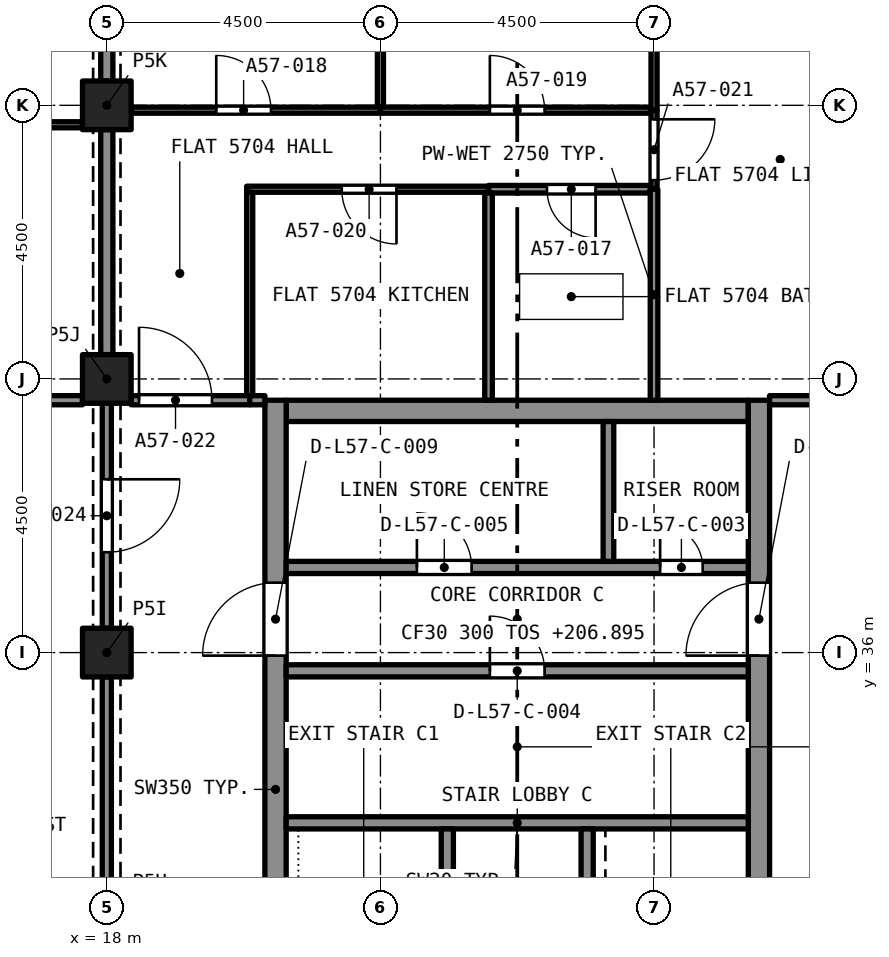
"""IFC4 building model, lengths in metres.
Left out: names, types, materials, properties, quantities, classifications, styles, units other than length and angle.
Written with IfcOpenShell. Run it as: python <this file> out.ifc"""

import sys

from ifc_helpers import new_model, si_unit, direction, frame, frame_2d, origin, origin_2d, place, context, subcontext, project, spatial, rectangle, extrude, element, fill, save


model = new_model("IFC4")
c1 = context("Model", 3, precision=1e-05, world=origin(), true_north=direction((0.0, 1.0)))
c2 = subcontext(c1, "Body", "Model", "MODEL_VIEW")
j1 = project(units=[si_unit("LENGTHUNIT", "METRE"), si_unit("PLANEANGLEUNIT", "RADIAN")], contexts=[c1])
p1 = place(None, origin())
s1 = spatial("IfcSite", under=j1, at=p1, CompositionType="ELEMENT")
p2 = place(p1, origin())
s2 = spatial("IfcBuilding", under=s1, at=p2, CompositionType="ELEMENT")
p3 = place(p2, frame((0.0, 0.0, 206.895)))
s3 = spatial("IfcBuildingStorey", under=s2, at=p3, CompositionType="ELEMENT", Elevation=206.895)
for number, where, z_axis, x_axis in (
    (1, (18.0, 36.0, 0.0), (0.0, 0.0, 1.0), (1.0, 0.0, 0.0)),
    (2, (18.0, 40.5, 0.0), (0.0, 0.0, 1.0), (1.0, 0.0, 0.0)),
    (3, (18.0, 45.0, 0.0), (0.0, 0.0, 1.0), (1.0, 0.0, 0.0)),
):
    element("IfcColumn", number, at=place(p3, frame(where, z_axis=z_axis, x_axis=x_axis)), inside=s3, PredefinedType="COLUMN", context=c2, shape_type="SweptSolid", body=[
        extrude(rectangle(XDim=0.8, YDim=0.8, at=origin_2d()), origin(), (0.0, 0.0, 1.0), 3.2),
    ])
p4 = place(p3, frame((20.95, 39.975, 0.0), z_axis=(0.0, 0.0, 1.0), x_axis=(1.0, 0.0, 0.0)))
e4 = element("IfcWall", 4, at=p4, inside=s3, PredefinedType="SOLIDWALL", context=c2, shape_type="SweptSolid", body=[
    extrude(rectangle(XDim=7.6, YDim=0.35, at=frame_2d((3.8, 0.0))), origin(), (0.0, 0.0, 1.0), 3.2),
])
p5 = place(p3, frame((20.775, 27.35, 0.0), z_axis=(0.0, 0.0, 1.0), x_axis=(0.0, 1.0, 0.0)))
e5 = element("IfcWall", 5, at=p5, inside=s3, PredefinedType="SOLIDWALL", context=c2, shape_type="SweptSolid", body=[
    extrude(rectangle(XDim=12.8, YDim=0.35, at=frame_2d((6.4, 0.0))), origin(), (0.0, 0.0, 1.0), 3.2),
])
p6 = place(p5, frame((8.6, 0.0, 0.0)))
e6 = element("IfcOpeningElement", 6, at=p6, cuts=e5, PredefinedType="OPENING", context=c2, shape_type="SweptSolid", body=[
    extrude(rectangle(XDim=1.2, YDim=2.1, at=frame_2d((0.6, 1.05))), frame((0.0, 0.185, 0.0), z_axis=(0.0, -1.0, 0.0), x_axis=(1.0, 0.0, 0.0)), (0.0, 0.0, 1.0), 0.37),
])
p7 = place(p3, frame((28.725, 27.35, 0.0), z_axis=(0.0, 0.0, 1.0), x_axis=(0.0, 1.0, 0.0)))
e7 = element("IfcWall", 7, at=p7, inside=s3, PredefinedType="SOLIDWALL", context=c2, shape_type="SweptSolid", body=[
    extrude(rectangle(XDim=12.8, YDim=0.35, at=frame_2d((6.4, 0.0))), origin(), (0.0, 0.0, 1.0), 3.2),
])
p8 = place(p7, frame((8.6, 0.0, 0.0)))
e8 = element("IfcOpeningElement", 8, at=p8, cuts=e7, PredefinedType="OPENING", context=c2, shape_type="SweptSolid", body=[
    extrude(rectangle(XDim=1.2, YDim=2.1, at=frame_2d((0.6, 1.05))), frame((0.0, 0.185, 0.0), z_axis=(0.0, -1.0, 0.0), x_axis=(1.0, 0.0, 0.0)), (0.0, 0.0, 1.0), 0.37),
])
p9 = place(p3, frame((13.5, 44.68, 0.0), z_axis=(0.0, 0.0, 1.0), x_axis=(1.0, 0.0, 0.0)))
e9 = element("IfcWall", 9, at=p9, inside=s3, PredefinedType="PARTITIONING", context=c2, shape_type="SweptSolid", body=[
    extrude(rectangle(XDim=4.1, YDim=0.1, at=frame_2d((2.05, 0.0))), origin(), (0.0, 0.0, 1.0), 2.9),
])
p10 = place(p9, frame((1.8, 0.0, 0.0)))
e10 = element("IfcOpeningElement", 10, at=p10, cuts=e9, PredefinedType="OPENING", context=c2, shape_type="SweptSolid", body=[
    extrude(rectangle(XDim=0.9, YDim=2.1, at=frame_2d((0.45, 1.05))), frame((0.0, 0.06, 0.0), z_axis=(0.0, -1.0, 0.0), x_axis=(1.0, 0.0, 0.0)), (0.0, 0.0, 1.0), 0.12),
])
for number, where, z_axis, x_axis in (
    (11, (18.0, 45.4, 0.0), (0.0, 0.0, 1.0), (0.0, 1.0, 0.0)),
    (12, (18.0, 40.9, 0.0), (0.0, 0.0, 1.0), (0.0, 1.0, 0.0)),
):
    element("IfcWall", number, at=place(p3, frame(where, z_axis=z_axis, x_axis=x_axis)), inside=s3, PredefinedType="PARTITIONING", context=c2, shape_type="SweptSolid", body=[
        extrude(rectangle(XDim=3.7, YDim=0.2, at=frame_2d((1.85, 0.0))), origin(), (0.0, 0.0, 1.0), 2.38),
    ])
p11 = place(p3, frame((14.95, 40.15, 0.0), z_axis=(0.0, 0.0, 1.0), x_axis=(1.0, 0.0, 0.0)))
e13 = element("IfcWall", 13, at=p11, inside=s3, PredefinedType="PARTITIONING", context=c2, shape_type="SweptSolid", body=[
    extrude(rectangle(XDim=2.65, YDim=0.15, at=frame_2d((1.325, 0.0))), origin(), (0.0, 0.0, 1.0), 2.9),
])
p12 = place(p11, frame((0.2, 0.0, 0.0)))
e14 = element("IfcOpeningElement", 14, at=p12, cuts=e13, PredefinedType="OPENING", context=c2, shape_type="SweptSolid", body=[
    extrude(rectangle(XDim=1.2, YDim=2.4, at=frame_2d((0.6, 1.2))), frame((0.0, 0.085, 0.0), z_axis=(0.0, -1.0, 0.0), x_axis=(1.0, 0.0, 0.0)), (0.0, 0.0, 1.0), 0.17),
])
p13 = place(p3, frame((26.938, 43.62, 0.0), z_axis=(0.0, 0.0, 1.0), x_axis=(-1.0, 0.0, 0.0)))
e15 = element("IfcWall", 15, at=p13, inside=s3, PredefinedType="PARTITIONING", context=c2, shape_type="SweptSolid", body=[
    extrude(rectangle(XDim=2.659, YDim=0.125, at=frame_2d((1.33, 0.0))), origin(), (0.0, 0.0, 1.0), 2.75),
])
p14 = place(p13, frame((0.898, 0.0, 0.0)))
e16 = element("IfcOpeningElement", 16, at=p14, cuts=e15, PredefinedType="OPENING", context=c2, shape_type="SweptSolid", body=[
    extrude(rectangle(XDim=0.8, YDim=2.1, at=frame_2d((0.4, 1.05))), frame((0.0, 0.073, 0.0), z_axis=(0.0, -1.0, 0.0), x_axis=(1.0, 0.0, 0.0)), (0.0, 0.0, 1.0), 0.145),
])
p15 = place(p3, frame((24.278, 40.15, 0.0), z_axis=(0.0, 0.0, 1.0), x_axis=(0.0, 1.0, 0.0)))
e17 = element("IfcWall", 17, at=p15, inside=s3, PredefinedType="PARTITIONING", context=c2, shape_type="SweptSolid", body=[
    extrude(rectangle(XDim=3.408, YDim=0.125, at=frame_2d((1.704, 0.0))), origin(), (0.0, 0.0, 1.0), 2.75),
])
p16 = place(p3, frame((27.0, 40.15, 0.0), z_axis=(0.0, 0.0, 1.0), x_axis=(0.0, 1.0, 0.0)))
e18 = element("IfcWall", 18, at=p16, inside=s3, PredefinedType="PARTITIONING", context=c2, shape_type="SweptSolid", body=[
    extrude(rectangle(XDim=3.47, YDim=0.125, at=frame_2d((1.735, 0.0))), origin(), (0.0, 0.0, 1.0), 2.75),
])
p17 = place(p3, frame((22.5, 44.97, 0.0), z_axis=(0.0, 0.0, 1.0), x_axis=(0.0, 1.0, 0.0)))
e19 = element("IfcWall", 19, at=p17, inside=s3, PredefinedType="PARTITIONING", context=c2, shape_type="SweptSolid", body=[
    extrude(rectangle(XDim=4.13, YDim=0.1, at=frame_2d((2.065, 0.0))), origin(), (0.0, 0.0, 1.0), 2.75),
])
p18 = place(p3, frame((18.4, 44.92, 0.0), z_axis=(0.0, 0.0, 1.0), x_axis=(1.0, 0.0, 0.0)))
e20 = element("IfcWall", 20, at=p18, inside=s3, PredefinedType="PARTITIONING", context=c2, shape_type="SweptSolid", body=[
    extrude(rectangle(XDim=4.1, YDim=0.1, at=frame_2d((2.05, 0.0))), origin(), (0.0, 0.0, 1.0), 2.75),
])
p19 = place(p18, frame((1.4, 0.0, 0.0)))
e21 = element("IfcOpeningElement", 21, at=p19, cuts=e20, PredefinedType="OPENING", context=c2, shape_type="SweptSolid", body=[
    extrude(rectangle(XDim=0.9, YDim=2.1, at=frame_2d((0.45, 1.05))), frame((0.0, 0.06, 0.0), z_axis=(0.0, -1.0, 0.0), x_axis=(1.0, 0.0, 0.0)), (0.0, 0.0, 1.0), 0.12),
])
p20 = place(p3, frame((22.5, 44.92, 0.0), z_axis=(0.0, 0.0, 1.0), x_axis=(1.0, 0.0, 0.0)))
e22 = element("IfcWall", 22, at=p20, inside=s3, PredefinedType="PARTITIONING", context=c2, shape_type="SweptSolid", body=[
    extrude(rectangle(XDim=4.45, YDim=0.1, at=frame_2d((2.225, 0.0))), origin(), (0.0, 0.0, 1.0), 2.75),
])
p21 = place(p20, frame((1.8, 0.0, 0.0)))
e23 = element("IfcOpeningElement", 23, at=p21, cuts=e22, PredefinedType="OPENING", context=c2, shape_type="SweptSolid", body=[
    extrude(rectangle(XDim=0.9, YDim=2.1, at=frame_2d((0.45, 1.05))), frame((0.0, 0.06, 0.0), z_axis=(0.0, -1.0, 0.0), x_axis=(1.0, 0.0, 0.0)), (0.0, 0.0, 1.0), 0.12),
])
p22 = place(p3, frame((27.0, 44.92, 0.0), z_axis=(0.0, 0.0, 1.0), x_axis=(0.0, 1.0, 0.0)))
e24 = element("IfcWall", 24, at=p22, inside=s3, PredefinedType="PARTITIONING", context=c2, shape_type="SweptSolid", body=[
    extrude(rectangle(XDim=4.147, YDim=0.1, at=frame_2d((2.074, 0.0))), origin(), (0.0, 0.0, 1.0), 2.75),
])
p23 = place(p3, frame((24.278, 43.62, 0.0), z_axis=(0.0, 0.0, 1.0), x_axis=(-1.0, 0.0, 0.0)))
e25 = element("IfcWall", 25, at=p23, inside=s3, PredefinedType="PARTITIONING", context=c2, shape_type="SweptSolid", body=[
    extrude(rectangle(XDim=3.978, YDim=0.1, at=frame_2d((1.989, 0.0))), origin(), (0.0, 0.0, 1.0), 2.75),
])
p24 = place(p23, frame((1.514, 0.0, 0.0)))
e26 = element("IfcOpeningElement", 26, at=p24, cuts=e25, PredefinedType="OPENING", context=c2, shape_type="SweptSolid", body=[
    extrude(rectangle(XDim=0.9, YDim=2.1, at=frame_2d((0.45, 1.05))), frame((0.0, 0.06, 0.0), z_axis=(0.0, -1.0, 0.0), x_axis=(1.0, 0.0, 0.0)), (0.0, 0.0, 1.0), 0.12),
])
p25 = place(p3, frame((20.35, 40.225, 0.0), z_axis=(0.0, 0.0, 1.0), x_axis=(0.0, 1.0, 0.0)))
e27 = element("IfcWall", 27, at=p25, inside=s3, PredefinedType="PARTITIONING", context=c2, shape_type="SweptSolid", body=[
    extrude(rectangle(XDim=3.345, YDim=0.1, at=frame_2d((1.672, 0.0))), origin(), (0.0, 0.0, 1.0), 2.75),
])
p26 = place(p3, frame((27.0, 44.92, 0.0), z_axis=(0.0, 0.0, 1.0), x_axis=(0.0, -1.0, 0.0)))
e28 = element("IfcWall", 28, at=p26, inside=s3, PredefinedType="PARTITIONING", context=c2, shape_type="SweptSolid", body=[
    extrude(rectangle(XDim=1.3, YDim=0.1, at=frame_2d((0.65, 0.0))), origin(), (0.0, 0.0, 1.0), 2.75),
])
p27 = place(p26, frame((0.15, 0.0, 0.0)))
e29 = element("IfcOpeningElement", 29, at=p27, cuts=e28, PredefinedType="OPENING", context=c2, shape_type="SweptSolid", body=[
    extrude(rectangle(XDim=1.0, YDim=2.1, at=frame_2d((0.5, 1.05))), frame((0.0, 0.06, 0.0), z_axis=(0.0, -1.0, 0.0), x_axis=(1.0, 0.0, 0.0)), (0.0, 0.0, 1.0), 0.12),
])
p28 = place(p3, frame((18.4, 40.15, 0.0), z_axis=(0.0, 0.0, 1.0), x_axis=(1.0, 0.0, 0.0)))
e30 = element("IfcWall", 30, at=p28, inside=s3, PredefinedType="PARTITIONING", context=c2, shape_type="SweptSolid", body=[
    extrude(rectangle(XDim=1.95, YDim=0.15, at=frame_2d((0.975, 0.0))), origin(), (0.0, 0.0, 1.0), 2.75),
])
p29 = place(p28, frame((0.13, 0.0, 0.0)))
e31 = element("IfcOpeningElement", 31, at=p29, cuts=e30, PredefinedType="OPENING", context=c2, shape_type="SweptSolid", body=[
    extrude(rectangle(XDim=1.2, YDim=2.4, at=frame_2d((0.6, 1.2))), frame((0.0, 0.085, 0.0), z_axis=(0.0, -1.0, 0.0), x_axis=(1.0, 0.0, 0.0)), (0.0, 0.0, 1.0), 0.17),
])
p30 = place(p3, frame((20.35, 40.15, 0.0), z_axis=(0.0, 0.0, 1.0), x_axis=(1.0, 0.0, 0.0)))
e32 = element("IfcWall", 32, at=p30, inside=s3, PredefinedType="PARTITIONING", context=c2, shape_type="SweptSolid", body=[
    extrude(rectangle(XDim=0.25, YDim=0.15, at=frame_2d((0.125, 0.0))), origin(), (0.0, 0.0, 1.0), 2.75),
])
p31 = place(p3, frame((28.9, 40.15, 0.0), z_axis=(0.0, 0.0, 1.0), x_axis=(1.0, 0.0, 0.0)))
e33 = element("IfcWall", 33, at=p31, inside=s3, PredefinedType="PARTITIONING", context=c2, shape_type="SweptSolid", body=[
    extrude(rectangle(XDim=2.2, YDim=0.15, at=frame_2d((1.1, 0.0))), origin(), (0.0, 0.0, 1.0), 2.75),
])
p32 = place(p3, frame((18.0, 31.9, 0.0), z_axis=(0.0, 0.0, 1.0), x_axis=(0.0, 1.0, 0.0)))
e34 = element("IfcWall", 34, at=p32, inside=s3, PredefinedType="PARTITIONING", context=c2, shape_type="SweptSolid", body=[
    extrude(rectangle(XDim=3.7, YDim=0.15, at=frame_2d((1.85, 0.0))), origin(), (0.0, 0.0, 1.0), 2.38),
])
p33 = place(p3, frame((18.0, 40.1, 0.0), z_axis=(0.0, 0.0, 1.0), x_axis=(0.0, -1.0, 0.0)))
e35 = element("IfcWall", 35, at=p33, inside=s3, PredefinedType="PARTITIONING", context=c2, shape_type="SweptSolid", body=[
    extrude(rectangle(XDim=3.7, YDim=0.15, at=frame_2d((1.85, 0.0))), origin(), (0.0, 0.0, 1.0), 2.38),
])
p34 = place(p33, frame((1.25, 0.0, 0.0)))
e36 = element("IfcOpeningElement", 36, at=p34, cuts=e35, PredefinedType="OPENING", context=c2, shape_type="SweptSolid", body=[
    extrude(rectangle(XDim=1.2, YDim=2.1, at=frame_2d((0.6, 1.05))), frame((0.0, 0.085, 0.0), z_axis=(0.0, -1.0, 0.0), x_axis=(1.0, 0.0, 0.0)), (0.0, 0.0, 1.0), 0.17),
])
p35 = place(p3, frame((20.95, 33.2, 0.0), z_axis=(0.0, 0.0, 1.0), x_axis=(1.0, 0.0, 0.0)))
e37 = element("IfcWall", 37, at=p35, inside=s3, PredefinedType="SOLIDWALL", context=c2, shape_type="SweptSolid", body=[
    extrude(rectangle(XDim=7.6, YDim=0.2, at=frame_2d((3.8, 0.0))), origin(), (0.0, 0.0, 1.0), 2.9),
])
p36 = place(p3, frame((20.95, 35.7, 0.0), z_axis=(0.0, 0.0, 1.0), x_axis=(1.0, 0.0, 0.0)))
e38 = element("IfcWall", 38, at=p36, inside=s3, PredefinedType="SOLIDWALL", context=c2, shape_type="SweptSolid", body=[
    extrude(rectangle(XDim=7.6, YDim=0.2, at=frame_2d((3.8, 0.0))), origin(), (0.0, 0.0, 1.0), 2.9),
])
p37 = place(p36, frame((3.35, 0.0, 0.0)))
e39 = element("IfcOpeningElement", 39, at=p37, cuts=e38, PredefinedType="OPENING", context=c2, shape_type="SweptSolid", body=[
    extrude(rectangle(XDim=0.9, YDim=2.1, at=frame_2d((0.45, 1.05))), frame((0.0, 0.11, 0.0), z_axis=(0.0, -1.0, 0.0), x_axis=(1.0, 0.0, 0.0)), (0.0, 0.0, 1.0), 0.22),
])
p38 = place(p3, frame((20.95, 37.4, 0.0), z_axis=(0.0, 0.0, 1.0), x_axis=(1.0, 0.0, 0.0)))
e40 = element("IfcWall", 40, at=p38, inside=s3, PredefinedType="SOLIDWALL", context=c2, shape_type="SweptSolid", body=[
    extrude(rectangle(XDim=7.6, YDim=0.2, at=frame_2d((3.8, 0.0))), origin(), (0.0, 0.0, 1.0), 2.9),
])
p39 = place(p38, frame((6.15, 0.0, 0.0)))
e41 = element("IfcOpeningElement", 41, at=p39, cuts=e40, PredefinedType="OPENING", context=c2, shape_type="SweptSolid", body=[
    extrude(rectangle(XDim=0.7, YDim=2.1, at=frame_2d((0.35, 1.05))), frame((0.0, 0.11, 0.0), z_axis=(0.0, -1.0, 0.0), x_axis=(1.0, 0.0, 0.0)), (0.0, 0.0, 1.0), 0.22),
])
p40 = place(p38, frame((2.15, 0.0, 0.0)))
e42 = element("IfcOpeningElement", 42, at=p40, cuts=e40, PredefinedType="OPENING", context=c2, shape_type="SweptSolid", body=[
    extrude(rectangle(XDim=0.9, YDim=2.1, at=frame_2d((0.45, 1.05))), frame((0.0, 0.11, 0.0), z_axis=(0.0, -1.0, 0.0), x_axis=(1.0, 0.0, 0.0)), (0.0, 0.0, 1.0), 0.22),
])
p41 = place(p3, frame((23.6, 27.7, 0.0), z_axis=(0.0, 0.0, 1.0), x_axis=(0.0, 1.0, 0.0)))
e43 = element("IfcWall", 43, at=p41, inside=s3, PredefinedType="SOLIDWALL", context=c2, shape_type="SweptSolid", body=[
    extrude(rectangle(XDim=5.4, YDim=0.2, at=frame_2d((2.7, 0.0))), origin(), (0.0, 0.0, 1.0), 2.9),
])
p42 = place(p41, frame((0.2, 0.0, 0.0)))
e44 = element("IfcOpeningElement", 44, at=p42, cuts=e43, PredefinedType="OPENING", context=c2, shape_type="SweptSolid", body=[
    extrude(rectangle(XDim=0.9, YDim=2.1, at=frame_2d((0.45, 1.05))), frame((0.0, 0.11, 0.0), z_axis=(0.0, -1.0, 0.0), x_axis=(1.0, 0.0, 0.0)), (0.0, 0.0, 1.0), 0.22),
])
p43 = place(p3, frame((25.9, 27.7, 0.0), z_axis=(0.0, 0.0, 1.0), x_axis=(0.0, 1.0, 0.0)))
e45 = element("IfcWall", 45, at=p43, inside=s3, PredefinedType="SOLIDWALL", context=c2, shape_type="SweptSolid", body=[
    extrude(rectangle(XDim=5.4, YDim=0.2, at=frame_2d((2.7, 0.0))), origin(), (0.0, 0.0, 1.0), 2.9),
])
p44 = place(p43, frame((0.2, 0.0, 0.0)))
e46 = element("IfcOpeningElement", 46, at=p44, cuts=e45, PredefinedType="OPENING", context=c2, shape_type="SweptSolid", body=[
    extrude(rectangle(XDim=0.9, YDim=2.1, at=frame_2d((0.45, 1.05))), frame((0.0, 0.11, 0.0), z_axis=(0.0, -1.0, 0.0), x_axis=(1.0, 0.0, 0.0)), (0.0, 0.0, 1.0), 0.22),
])
p45 = place(p3, frame((26.25, 37.5, 0.0), z_axis=(0.0, 0.0, 1.0), x_axis=(0.0, 1.0, 0.0)))
e47 = element("IfcWall", 47, at=p45, inside=s3, PredefinedType="SOLIDWALL", context=c2, shape_type="SweptSolid", body=[
    extrude(rectangle(XDim=2.3, YDim=0.175, at=frame_2d((1.15, 0.0))), origin(), (0.0, 0.0, 1.0), 2.9),
])
p46 = place(p14, origin())
e48 = element("IfcDoor", 48, at=p46, inside=s3, OperationType="SINGLE_SWING_LEFT", PredefinedType="DOOR", context=c2, shape_type="SweptSolid", body=[
    extrude(rectangle(XDim=0.8, YDim=2.1, at=frame_2d((0.4, 1.05))), frame((0.0, 0.025, 0.0), z_axis=(0.0, -1.0, 0.0), x_axis=(1.0, 0.0, 0.0)), (0.0, 0.0, 1.0), 0.05),
])
fill(e16, e48)
p47 = place(p19, origin())
e49 = element("IfcDoor", 49, at=p47, inside=s3, OperationType="SINGLE_SWING_LEFT", PredefinedType="DOOR", context=c2, shape_type="SweptSolid", body=[
    extrude(rectangle(XDim=0.9, YDim=2.1, at=frame_2d((0.45, 1.05))), frame((0.0, 0.025, 0.0), z_axis=(0.0, -1.0, 0.0), x_axis=(1.0, 0.0, 0.0)), (0.0, 0.0, 1.0), 0.05),
])
fill(e21, e49)
p48 = place(p21, origin())
e50 = element("IfcDoor", 50, at=p48, inside=s3, OperationType="SINGLE_SWING_RIGHT", PredefinedType="DOOR", context=c2, shape_type="SweptSolid", body=[
    extrude(rectangle(XDim=0.9, YDim=2.1, at=frame_2d((0.45, 1.05))), frame((0.0, 0.025, 0.0), z_axis=(0.0, -1.0, 0.0), x_axis=(1.0, 0.0, 0.0)), (0.0, 0.0, 1.0), 0.05),
])
fill(e23, e50)
p49 = place(p24, origin())
e51 = element("IfcDoor", 51, at=p49, inside=s3, OperationType="SINGLE_SWING_LEFT", PredefinedType="DOOR", context=c2, shape_type="SweptSolid", body=[
    extrude(rectangle(XDim=0.9, YDim=2.1, at=frame_2d((0.45, 1.05))), frame((0.0, 0.025, 0.0), z_axis=(0.0, -1.0, 0.0), x_axis=(1.0, 0.0, 0.0)), (0.0, 0.0, 1.0), 0.05),
])
fill(e26, e51)
p50 = place(p27, origin())
e52 = element("IfcDoor", 52, at=p50, inside=s3, OperationType="SINGLE_SWING_LEFT", PredefinedType="DOOR", context=c2, shape_type="SweptSolid", body=[
    extrude(rectangle(XDim=1.0, YDim=2.1, at=frame_2d((0.5, 1.05))), frame((0.0, 0.025, 0.0), z_axis=(0.0, -1.0, 0.0), x_axis=(1.0, 0.0, 0.0)), (0.0, 0.0, 1.0), 0.05),
])
fill(e29, e52)
p51 = place(p29, origin())
e53 = element("IfcDoor", 53, at=p51, inside=s3, OperationType="SINGLE_SWING_LEFT", PredefinedType="DOOR", context=c2, shape_type="SweptSolid", body=[
    extrude(rectangle(XDim=1.2, YDim=2.4, at=frame_2d((0.6, 1.2))), frame((0.0, 0.025, 0.0), z_axis=(0.0, -1.0, 0.0), x_axis=(1.0, 0.0, 0.0)), (0.0, 0.0, 1.0), 0.05),
])
fill(e31, e53)
p52 = place(p34, origin())
e54 = element("IfcDoor", 54, at=p52, inside=s3, OperationType="SINGLE_SWING_LEFT", PredefinedType="DOOR", context=c2, shape_type="SweptSolid", body=[
    extrude(rectangle(XDim=1.2, YDim=2.1, at=frame_2d((0.6, 1.05))), frame((0.0, 0.025, 0.0), z_axis=(0.0, -1.0, 0.0), x_axis=(1.0, 0.0, 0.0)), (0.0, 0.0, 1.0), 0.05),
])
fill(e36, e54)
p53 = place(p39, origin())
e55 = element("IfcDoor", 55, at=p53, inside=s3, OperationType="SINGLE_SWING_LEFT", PredefinedType="DOOR", context=c2, shape_type="SweptSolid", body=[
    extrude(rectangle(XDim=0.7, YDim=2.1, at=frame_2d((0.35, 1.05))), frame((0.0, 0.025, 0.0), z_axis=(0.0, -1.0, 0.0), x_axis=(1.0, 0.0, 0.0)), (0.0, 0.0, 1.0), 0.05),
])
fill(e41, e55)
p54 = place(p37, origin())
e56 = element("IfcDoor", 56, at=p54, inside=s3, OperationType="SINGLE_SWING_LEFT", PredefinedType="DOOR", context=c2, shape_type="SweptSolid", body=[
    extrude(rectangle(XDim=0.9, YDim=2.1, at=frame_2d((0.45, 1.05))), frame((0.0, 0.025, 0.0), z_axis=(0.0, -1.0, 0.0), x_axis=(1.0, 0.0, 0.0)), (0.0, 0.0, 1.0), 0.05),
])
fill(e39, e56)
p55 = place(p40, origin())
e57 = element("IfcDoor", 57, at=p55, inside=s3, OperationType="SINGLE_SWING_LEFT", PredefinedType="DOOR", context=c2, shape_type="SweptSolid", body=[
    extrude(rectangle(XDim=0.9, YDim=2.1, at=frame_2d((0.45, 1.05))), frame((0.0, 0.025, 0.0), z_axis=(0.0, -1.0, 0.0), x_axis=(1.0, 0.0, 0.0)), (0.0, 0.0, 1.0), 0.05),
])
fill(e42, e57)
p56 = place(p6, origin())
e58 = element("IfcDoor", 58, at=p56, inside=s3, OperationType="SINGLE_SWING_LEFT", PredefinedType="DOOR", context=c2, shape_type="SweptSolid", body=[
    extrude(rectangle(XDim=1.2, YDim=2.1, at=frame_2d((0.6, 1.05))), frame((0.0, 0.025, 0.0), z_axis=(0.0, -1.0, 0.0), x_axis=(1.0, 0.0, 0.0)), (0.0, 0.0, 1.0), 0.05),
])
fill(e6, e58)
p57 = place(p8, origin())
e59 = element("IfcDoor", 59, at=p57, inside=s3, OperationType="SINGLE_SWING_LEFT", PredefinedType="DOOR", context=c2, shape_type="SweptSolid", body=[
    extrude(rectangle(XDim=1.2, YDim=2.1, at=frame_2d((0.6, 1.05))), frame((0.0, 0.025, 0.0), z_axis=(0.0, -1.0, 0.0), x_axis=(1.0, 0.0, 0.0)), (0.0, 0.0, 1.0), 0.05),
])
fill(e8, e59)
save(model, sys.argv[1])
